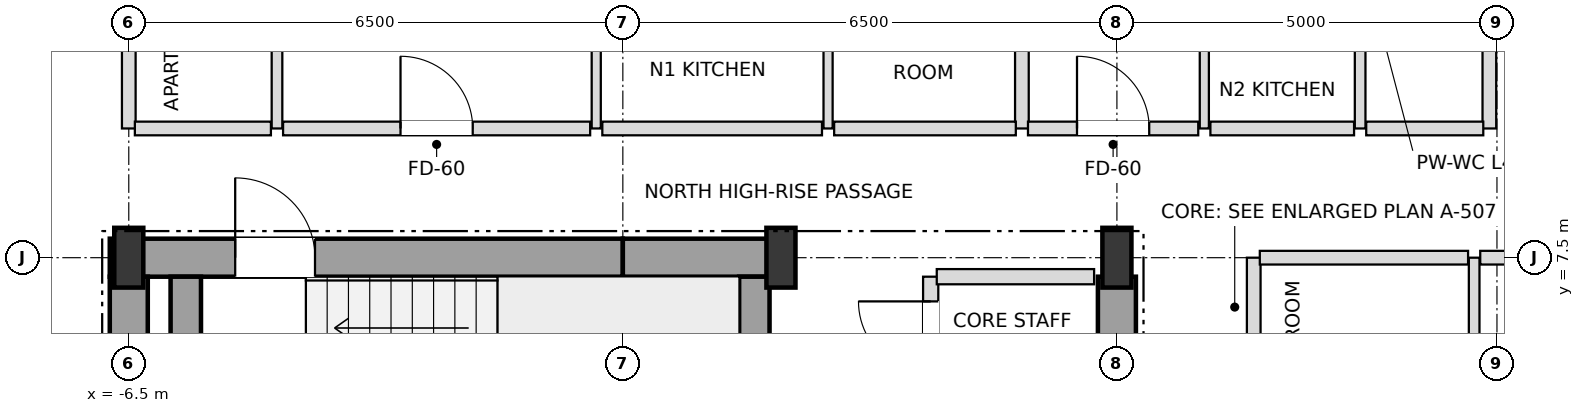
"""IFC4 building model, lengths in metres.
Left out: names, types, materials, properties, quantities, classifications, styles, units other than length and angle.
Written with IfcOpenShell. Run it as: python <this file> out.ifc"""

import sys

from ifc_helpers import new_model, si_unit, direction, frame, frame_2d, origin, origin_2d, place, context, subcontext, project, spatial, rectangle, i_section, extrude, element, fill, save


model = new_model("IFC4")
c1 = context("Model", 3, precision=1e-05, world=origin(), true_north=direction((0.0, 1.0)))
c2 = subcontext(c1, "Body", "Model", "MODEL_VIEW")
j1 = project(units=[si_unit("LENGTHUNIT", "METRE"), si_unit("PLANEANGLEUNIT", "RADIAN")], contexts=[c1])
p1 = place(None, origin())
s1 = spatial("IfcSite", under=j1, at=p1, CompositionType="ELEMENT")
p2 = place(p1, origin())
s2 = spatial("IfcBuilding", under=s1, at=p2, CompositionType="ELEMENT")
p3 = place(p2, frame((0.0, 0.0, 283.5)))
s3 = spatial("IfcBuildingStorey", under=s2, at=p3, CompositionType="ELEMENT", Elevation=283.5)
for number, where, z_axis, x_axis in (
    (1, (-6.5, 7.5, 0.0), (0.0, 0.0, 1.0), (1.0, 0.0, 0.0)),
    (2, (2.08, 7.5, 0.0), (0.0, 0.0, 1.0), (1.0, 0.0, 0.0)),
    (3, (6.5, 7.5, 0.0), (0.0, 0.0, 1.0), (1.0, 0.0, 0.0)),
):
    element("IfcColumn", number, at=place(p3, frame(where, z_axis=z_axis, x_axis=x_axis)), inside=s3, PredefinedType="COLUMN", context=c2, shape_type="SweptSolid", body=[
        extrude(i_section(OverallWidth=0.382, OverallDepth=0.786, WebThickness=0.02, FlangeThickness=0.033, at=origin_2d()), origin(), (0.0, 0.0, 1.0), 3.6),
    ])
p4 = place(p3, frame((-6.75, 7.5, 0.0), z_axis=(0.0, 0.0, 1.0), x_axis=(1.0, 0.0, 0.0)))
e4 = element("IfcWall", 4, at=p4, inside=s3, PredefinedType="SHEAR", context=c2, shape_type="SweptSolid", body=[
    extrude(rectangle(XDim=6.75, YDim=0.5, at=frame_2d((3.375, 0.0))), origin(), (0.0, 0.0, 1.0), 3.38),
])
p5 = place(p4, frame((1.65, 0.0, 0.0)))
e5 = element("IfcOpeningElement", 5, at=p5, cuts=e4, PredefinedType="OPENING", context=c2, shape_type="SweptSolid", body=[
    extrude(rectangle(XDim=1.05, YDim=2.15, at=frame_2d((0.525, 1.075))), frame((0.0, 0.26, 0.0), z_axis=(0.0, -1.0, 0.0), x_axis=(1.0, 0.0, 0.0)), (0.0, 0.0, 1.0), 0.52),
])
p6 = place(p3, frame((0.0, 7.5, 0.0), z_axis=(0.0, 0.0, 1.0), x_axis=(1.0, 0.0, 0.0)))
e6 = element("IfcWall", 6, at=p6, inside=s3, PredefinedType="SHEAR", context=c2, shape_type="SweptSolid", body=[
    extrude(rectangle(XDim=2.08, YDim=0.5, at=frame_2d((1.04, 0.0))), origin(), (0.0, 0.0, 1.0), 3.38),
])
for number, where, z_axis, x_axis in (
    (7, (-6.5, 3.95, 0.0), (0.0, 0.0, 1.0), (0.0, 1.0, 0.0)),
    (8, (6.5, 3.95, 0.0), (0.0, 0.0, 1.0), (0.0, 1.0, 0.0)),
):
    element("IfcWall", number, at=place(p3, frame(where, z_axis=z_axis, x_axis=x_axis)), inside=s3, PredefinedType="SHEAR", context=c2, shape_type="SweptSolid", body=[
        extrude(rectangle(XDim=3.3, YDim=0.5, at=frame_2d((1.65, 0.0))), origin(), (0.0, 0.0, 1.0), 3.38),
    ])
for number, where, z_axis, x_axis in (
    (9, (1.73, 3.95, 0.0), (0.0, 0.0, 1.0), (0.0, 1.0, 0.0)),
    (10, (-5.75, 3.95, 0.0), (0.0, 0.0, 1.0), (0.0, 1.0, 0.0)),
):
    element("IfcWall", number, at=place(p3, frame(where, z_axis=z_axis, x_axis=x_axis)), inside=s3, PredefinedType="SHEAR", context=c2, shape_type="SweptSolid", body=[
        extrude(rectangle(XDim=3.3, YDim=0.4, at=frame_2d((1.65, 0.0))), origin(), (0.0, 0.0, 1.0), 3.38),
    ])
p7 = place(p3, frame((-6.5, 9.2, 0.0), z_axis=(0.0, 0.0, 1.0), x_axis=(0.0, 1.0, 0.0)))
e11 = element("IfcWall", 11, at=p7, inside=s3, PredefinedType="PARTITIONING", context=c2, shape_type="SweptSolid", body=[
    extrude(rectangle(XDim=10.7, YDim=0.18, at=frame_2d((5.35, 0.0))), origin(), (0.0, 0.0, 1.0), 2.826),
])
p8 = place(p3, frame((-4.55, 9.2, 0.0), z_axis=(0.0, 0.0, 1.0), x_axis=(0.0, 1.0, 0.0)))
e12 = element("IfcWall", 12, at=p8, inside=s3, PredefinedType="PARTITIONING", context=c2, shape_type="SweptSolid", body=[
    extrude(rectangle(XDim=4.7, YDim=0.14, at=frame_2d((2.35, 0.0))), origin(), (0.0, 0.0, 1.0), 3.38),
])
p9 = place(p8, frame((1.9, 0.0, 0.0)))
e13 = element("IfcOpeningElement", 13, at=p9, cuts=e12, PredefinedType="OPENING", context=c2, shape_type="SweptSolid", body=[
    extrude(rectangle(XDim=0.9, YDim=2.1, at=frame_2d((0.45, 1.05))), frame((0.0, 0.08, 0.0), z_axis=(0.0, -1.0, 0.0), x_axis=(1.0, 0.0, 0.0)), (0.0, 0.0, 1.0), 0.16),
])
p10 = place(p3, frame((-0.35, 9.2, 0.0), z_axis=(0.0, 0.0, 1.0), x_axis=(0.0, 1.0, 0.0)))
e14 = element("IfcWall", 14, at=p10, inside=s3, PredefinedType="PARTITIONING", context=c2, shape_type="SweptSolid", body=[
    extrude(rectangle(XDim=4.7, YDim=0.12, at=frame_2d((2.35, 0.0))), origin(), (0.0, 0.0, 1.0), 3.38),
])
p11 = place(p10, frame((1.875, 0.0, 0.0)))
e15 = element("IfcOpeningElement", 15, at=p11, cuts=e14, PredefinedType="OPENING", context=c2, shape_type="SweptSolid", body=[
    extrude(rectangle(XDim=0.95, YDim=2.1, at=frame_2d((0.475, 1.05))), frame((0.0, 0.07, 0.0), z_axis=(0.0, -1.0, 0.0), x_axis=(1.0, 0.0, 0.0)), (0.0, 0.0, 1.0), 0.14),
])
p12 = place(p3, frame((2.7, 9.2, 0.0), z_axis=(0.0, 0.0, 1.0), x_axis=(0.0, 1.0, 0.0)))
e16 = element("IfcWall", 16, at=p12, inside=s3, PredefinedType="PARTITIONING", context=c2, shape_type="SweptSolid", body=[
    extrude(rectangle(XDim=4.7, YDim=0.12, at=frame_2d((2.35, 0.0))), origin(), (0.0, 0.0, 1.0), 3.38),
])
p13 = place(p12, frame((1.9, 0.0, 0.0)))
e17 = element("IfcOpeningElement", 17, at=p13, cuts=e16, PredefinedType="OPENING", context=c2, shape_type="SweptSolid", body=[
    extrude(rectangle(XDim=0.9, YDim=2.1, at=frame_2d((0.45, 1.05))), frame((0.0, 0.07, 0.0), z_axis=(0.0, -1.0, 0.0), x_axis=(1.0, 0.0, 0.0)), (0.0, 0.0, 1.0), 0.14),
])
p14 = place(p3, frame((4.05, 4.2, 0.0), z_axis=(0.0, 0.0, 1.0), x_axis=(0.0, 1.0, 0.0)))
e18 = element("IfcWall", 18, at=p14, inside=s3, PredefinedType="SOLIDWALL", context=c2, shape_type="SweptSolid", body=[
    extrude(rectangle(XDim=3.05, YDim=0.2, at=frame_2d((1.525, 0.0))), origin(), (0.0, 0.0, 1.0), 3.38),
])
p15 = place(p14, frame((0.275, 0.0, 0.0)))
e19 = element("IfcOpeningElement", 19, at=p15, cuts=e18, PredefinedType="OPENING", context=c2, shape_type="SweptSolid", body=[
    extrude(rectangle(XDim=0.95, YDim=2.15, at=frame_2d((0.475, 1.075))), frame((0.0, 0.11, 0.0), z_axis=(0.0, -1.0, 0.0), x_axis=(1.0, 0.0, 0.0)), (0.0, 0.0, 1.0), 0.22),
])
p16 = place(p14, frame((1.775, 0.0, 0.0)))
e20 = element("IfcOpeningElement", 20, at=p16, cuts=e18, PredefinedType="OPENING", context=c2, shape_type="SweptSolid", body=[
    extrude(rectangle(XDim=0.95, YDim=2.15, at=frame_2d((0.475, 1.075))), frame((0.0, 0.11, 0.0), z_axis=(0.0, -1.0, 0.0), x_axis=(1.0, 0.0, 0.0)), (0.0, 0.0, 1.0), 0.22),
])
p17 = place(p3, frame((5.25, 9.2, 0.0), z_axis=(0.0, 0.0, 1.0), x_axis=(0.0, 1.0, 0.0)))
e21 = element("IfcWall", 21, at=p17, inside=s3, PredefinedType="PARTITIONING", context=c2, shape_type="SweptSolid", body=[
    extrude(rectangle(XDim=10.7, YDim=0.18, at=frame_2d((5.35, 0.0))), origin(), (0.0, 0.0, 1.0), 3.018),
])
p18 = place(p3, frame((7.65, 9.2, 0.0), z_axis=(0.0, 0.0, 1.0), x_axis=(0.0, 1.0, 0.0)))
e22 = element("IfcWall", 22, at=p18, inside=s3, PredefinedType="PARTITIONING", context=c2, shape_type="SweptSolid", body=[
    extrude(rectangle(XDim=4.7, YDim=0.12, at=frame_2d((2.35, 0.0))), origin(), (0.0, 0.0, 1.0), 2.826),
])
p19 = place(p18, frame((1.875, 0.0, 0.0)))
e23 = element("IfcOpeningElement", 23, at=p19, cuts=e22, PredefinedType="OPENING", context=c2, shape_type="SweptSolid", body=[
    extrude(rectangle(XDim=0.95, YDim=2.1, at=frame_2d((0.475, 1.05))), frame((0.0, 0.07, 0.0), z_axis=(0.0, -1.0, 0.0), x_axis=(1.0, 0.0, 0.0)), (0.0, 0.0, 1.0), 0.14),
])
p20 = place(p3, frame((8.3, -7.5, 0.0), z_axis=(0.0, 0.0, 1.0), x_axis=(0.0, 1.0, 0.0)))
e24 = element("IfcWall", 24, at=p20, inside=s3, PredefinedType="PARTITIONING", context=c2, shape_type="SweptSolid", body=[
    extrude(rectangle(XDim=15.0, YDim=0.18, at=frame_2d((7.5, 0.0))), origin(), (0.0, 0.0, 1.0), 3.38),
])
p21 = place(p20, frame((2.355, 0.0, 0.0)))
e25 = element("IfcOpeningElement", 25, at=p21, cuts=e24, PredefinedType="OPENING", context=c2, shape_type="SweptSolid", body=[
    extrude(rectangle(XDim=0.95, YDim=2.15, at=frame_2d((0.475, 1.075))), frame((0.0, 0.1, 0.0), z_axis=(0.0, -1.0, 0.0), x_axis=(1.0, 0.0, 0.0)), (0.0, 0.0, 1.0), 0.2),
])
p22 = place(p3, frame((9.7, 9.2, 0.0), z_axis=(0.0, 0.0, 1.0), x_axis=(0.0, 1.0, 0.0)))
e26 = element("IfcWall", 26, at=p22, inside=s3, PredefinedType="PARTITIONING", context=c2, shape_type="SweptSolid", body=[
    extrude(rectangle(XDim=4.7, YDim=0.14, at=frame_2d((2.35, 0.0))), origin(), (0.0, 0.0, 1.0), 2.826),
])
p23 = place(p22, frame((1.9, 0.0, 0.0)))
e27 = element("IfcOpeningElement", 27, at=p23, cuts=e26, PredefinedType="OPENING", context=c2, shape_type="SweptSolid", body=[
    extrude(rectangle(XDim=0.9, YDim=2.1, at=frame_2d((0.45, 1.05))), frame((0.0, 0.08, 0.0), z_axis=(0.0, -1.0, 0.0), x_axis=(1.0, 0.0, 0.0)), (0.0, 0.0, 1.0), 0.16),
])
p24 = place(p3, frame((11.2, -7.5, 0.0), z_axis=(0.0, 0.0, 1.0), x_axis=(0.0, 1.0, 0.0)))
e28 = element("IfcWall", 28, at=p24, inside=s3, PredefinedType="PARTITIONING", context=c2, shape_type="SweptSolid", body=[
    extrude(rectangle(XDim=15.0, YDim=0.14, at=frame_2d((7.5, 0.0))), origin(), (0.0, 0.0, 1.0), 3.38),
])
p25 = place(p24, frame((3.475, 0.0, 0.0)))
e29 = element("IfcOpeningElement", 29, at=p25, cuts=e28, PredefinedType="OPENING", context=c2, shape_type="SweptSolid", body=[
    extrude(rectangle(XDim=0.95, YDim=2.1, at=frame_2d((0.475, 1.05))), frame((0.0, 0.08, 0.0), z_axis=(0.0, -1.0, 0.0), x_axis=(1.0, 0.0, 0.0)), (0.0, 0.0, 1.0), 0.16),
])
p26 = place(p3, frame((11.4, 9.2, 0.0), z_axis=(0.0, 0.0, 1.0), x_axis=(0.0, 1.0, 0.0)))
e30 = element("IfcWall", 30, at=p26, inside=s3, PredefinedType="PARTITIONING", context=c2, shape_type="SweptSolid", body=[
    extrude(rectangle(XDim=5.07, YDim=0.18, at=frame_2d((2.535, 0.0))), origin(), (0.0, 0.0, 1.0), 2.748),
])
p27 = place(p3, frame((4.13, 7.25, 0.0), z_axis=(0.0, 0.0, 1.0), x_axis=(1.0, 0.0, 0.0)))
e31 = element("IfcWall", 31, at=p27, inside=s3, PredefinedType="SOLIDWALL", context=c2, shape_type="SweptSolid", body=[
    extrude(rectangle(XDim=2.07, YDim=0.2, at=frame_2d((1.035, 0.0))), origin(), (0.0, 0.0, 1.0), 3.38),
])
p28 = place(p3, frame((8.38, 7.5, 0.0), z_axis=(0.0, 0.0, 1.0), x_axis=(1.0, 0.0, 0.0)))
e32 = element("IfcWall", 32, at=p28, inside=s3, PredefinedType="PARTITIONING", context=c2, shape_type="SweptSolid", body=[
    extrude(rectangle(XDim=2.74, YDim=0.18, at=frame_2d((1.37, 0.0))), origin(), (0.0, 0.0, 1.0), 2.826),
])
p29 = place(p3, frame((11.28, 7.5, 0.0), z_axis=(0.0, 0.0, 1.0), x_axis=(1.0, 0.0, 0.0)))
e33 = element("IfcWall", 33, at=p29, inside=s3, PredefinedType="PARTITIONING", context=c2, shape_type="SweptSolid", body=[
    extrude(rectangle(XDim=5.62, YDim=0.18, at=frame_2d((2.81, 0.0))), origin(), (0.0, 0.0, 1.0), 2.826),
])
p30 = place(p3, frame((-6.42, 9.2, 0.0), z_axis=(0.0, 0.0, 1.0), x_axis=(1.0, 0.0, 0.0)))
e34 = element("IfcWall", 34, at=p30, inside=s3, PredefinedType="PARTITIONING", context=c2, shape_type="SweptSolid", body=[
    extrude(rectangle(XDim=1.79, YDim=0.18, at=frame_2d((0.895, 0.0))), origin(), (0.0, 0.0, 1.0), 3.38),
])
p31 = place(p3, frame((-4.47, 9.2, 0.0), z_axis=(0.0, 0.0, 1.0), x_axis=(1.0, 0.0, 0.0)))
e35 = element("IfcWall", 35, at=p31, inside=s3, PredefinedType="PARTITIONING", context=c2, shape_type="SweptSolid", body=[
    extrude(rectangle(XDim=4.04, YDim=0.18, at=frame_2d((2.02, 0.0))), origin(), (0.0, 0.0, 1.0), 3.38),
])
p32 = place(p31, frame((1.545, 0.0, 0.0)))
e36 = element("IfcOpeningElement", 36, at=p32, cuts=e35, PredefinedType="OPENING", context=c2, shape_type="SweptSolid", body=[
    extrude(rectangle(XDim=0.95, YDim=2.15, at=frame_2d((0.475, 1.075))), frame((0.0, 0.1, 0.0), z_axis=(0.0, -1.0, 0.0), x_axis=(1.0, 0.0, 0.0)), (0.0, 0.0, 1.0), 0.2),
])
p33 = place(p3, frame((-0.27, 9.2, 0.0), z_axis=(0.0, 0.0, 1.0), x_axis=(1.0, 0.0, 0.0)))
e37 = element("IfcWall", 37, at=p33, inside=s3, PredefinedType="PARTITIONING", context=c2, shape_type="SweptSolid", body=[
    extrude(rectangle(XDim=2.89, YDim=0.18, at=frame_2d((1.445, 0.0))), origin(), (0.0, 0.0, 1.0), 3.38),
])
p34 = place(p3, frame((2.78, 9.2, 0.0), z_axis=(0.0, 0.0, 1.0), x_axis=(1.0, 0.0, 0.0)))
e38 = element("IfcWall", 38, at=p34, inside=s3, PredefinedType="PARTITIONING", context=c2, shape_type="SweptSolid", body=[
    extrude(rectangle(XDim=2.39, YDim=0.18, at=frame_2d((1.195, 0.0))), origin(), (0.0, 0.0, 1.0), 3.38),
])
p35 = place(p3, frame((5.33, 9.2, 0.0), z_axis=(0.0, 0.0, 1.0), x_axis=(1.0, 0.0, 0.0)))
e39 = element("IfcWall", 39, at=p35, inside=s3, PredefinedType="PARTITIONING", context=c2, shape_type="SweptSolid", body=[
    extrude(rectangle(XDim=2.24, YDim=0.18, at=frame_2d((1.12, 0.0))), origin(), (0.0, 0.0, 1.0), 2.826),
])
p36 = place(p35, frame((0.645, 0.0, 0.0)))
e40 = element("IfcOpeningElement", 40, at=p36, cuts=e39, PredefinedType="OPENING", context=c2, shape_type="SweptSolid", body=[
    extrude(rectangle(XDim=0.95, YDim=2.15, at=frame_2d((0.475, 1.075))), frame((0.0, 0.1, 0.0), z_axis=(0.0, -1.0, 0.0), x_axis=(1.0, 0.0, 0.0)), (0.0, 0.0, 1.0), 0.2),
])
p37 = place(p3, frame((7.73, 9.2, 0.0), z_axis=(0.0, 0.0, 1.0), x_axis=(1.0, 0.0, 0.0)))
e41 = element("IfcWall", 41, at=p37, inside=s3, PredefinedType="PARTITIONING", context=c2, shape_type="SweptSolid", body=[
    extrude(rectangle(XDim=1.89, YDim=0.18, at=frame_2d((0.945, 0.0))), origin(), (0.0, 0.0, 1.0), 3.38),
])
p38 = place(p3, frame((9.78, 9.2, 0.0), z_axis=(0.0, 0.0, 1.0), x_axis=(1.0, 0.0, 0.0)))
e42 = element("IfcWall", 42, at=p38, inside=s3, PredefinedType="PARTITIONING", context=c2, shape_type="SweptSolid", body=[
    extrude(rectangle(XDim=1.54, YDim=0.18, at=frame_2d((0.77, 0.0))), origin(), (0.0, 0.0, 1.0), 3.38),
])
p39 = place(p5, origin())
e43 = element("IfcDoor", 43, at=p39, inside=s3, OperationType="SINGLE_SWING_LEFT", PredefinedType="DOOR", context=c2, shape_type="SweptSolid", body=[
    extrude(rectangle(XDim=1.05, YDim=2.15, at=frame_2d((0.525, 1.075))), frame((0.0, 0.025, 0.0), z_axis=(0.0, -1.0, 0.0), x_axis=(1.0, 0.0, 0.0)), (0.0, 0.0, 1.0), 0.05),
])
fill(e5, e43)
p40 = place(p16, origin())
e44 = element("IfcDoor", 44, at=p40, inside=s3, OperationType="SINGLE_SWING_RIGHT", PredefinedType="DOOR", context=c2, shape_type="SweptSolid", body=[
    extrude(rectangle(XDim=0.95, YDim=2.15, at=frame_2d((0.475, 1.075))), frame((0.0, 0.025, 0.0), z_axis=(0.0, -1.0, 0.0), x_axis=(1.0, 0.0, 0.0)), (0.0, 0.0, 1.0), 0.05),
])
fill(e20, e44)
p41 = place(p32, origin())
e45 = element("IfcDoor", 45, at=p41, inside=s3, OperationType="SINGLE_SWING_LEFT", PredefinedType="DOOR", context=c2, shape_type="SweptSolid", body=[
    extrude(rectangle(XDim=0.95, YDim=2.15, at=frame_2d((0.475, 1.075))), frame((0.0, 0.025, 0.0), z_axis=(0.0, -1.0, 0.0), x_axis=(1.0, 0.0, 0.0)), (0.0, 0.0, 1.0), 0.05),
])
fill(e36, e45)
p42 = place(p36, origin())
e46 = element("IfcDoor", 46, at=p42, inside=s3, OperationType="SINGLE_SWING_LEFT", PredefinedType="DOOR", context=c2, shape_type="SweptSolid", body=[
    extrude(rectangle(XDim=0.95, YDim=2.15, at=frame_2d((0.475, 1.075))), frame((0.0, 0.025, 0.0), z_axis=(0.0, -1.0, 0.0), x_axis=(1.0, 0.0, 0.0)), (0.0, 0.0, 1.0), 0.05),
])
fill(e40, e46)
save(model, sys.argv[1])
